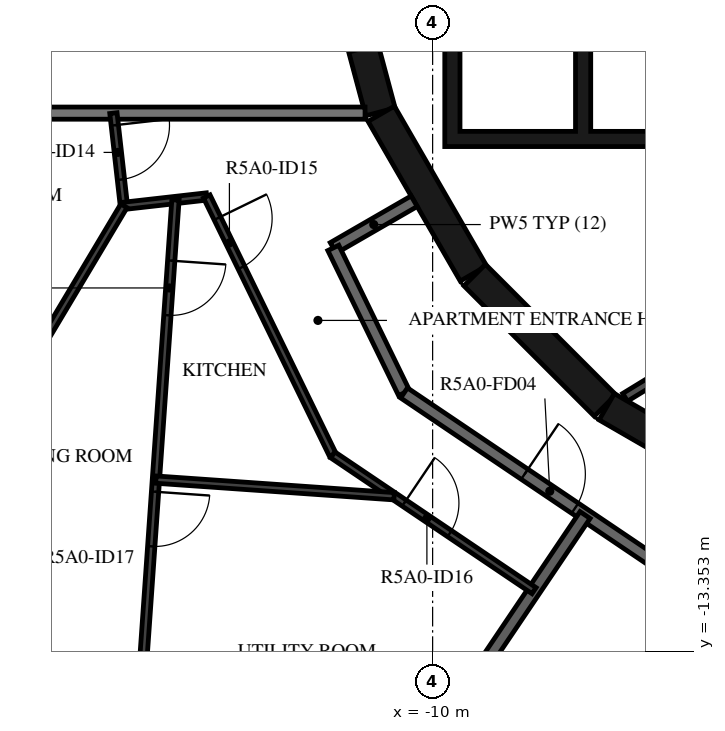
"""IFC4 building model, lengths in metres.
Left out: names, types, materials, properties, quantities, classifications, styles, units other than length and angle.
Written with IfcOpenShell. Run it as: python <this file> out.ifc"""

import sys

from ifc_helpers import new_model, si_unit, direction, frame, frame_2d, origin, place, context, subcontext, project, spatial, polyline, rectangle, outline, extrude, element, fill, save


model = new_model("IFC4")
c1 = context("Model", 3, precision=1e-05, world=origin(), true_north=direction((0.0, 1.0)))
c2 = subcontext(c1, "Body", "Model", "MODEL_VIEW")
j1 = project(units=[si_unit("LENGTHUNIT", "METRE"), si_unit("PLANEANGLEUNIT", "RADIAN")], contexts=[c1])
p1 = place(None, origin())
s1 = spatial("IfcSite", under=j1, at=p1, CompositionType="ELEMENT")
p2 = place(p1, origin())
s2 = spatial("IfcBuilding", under=s1, at=p2, CompositionType="ELEMENT")
p3 = place(p2, frame((0.0, 0.0, 195.4)))
s3 = spatial("IfcBuildingStorey", under=s2, at=p3, CompositionType="ELEMENT", Elevation=195.4)
p4 = place(p3, frame((-11.643, -1.55, 0.0), z_axis=(0.0, 0.0, 1.0), x_axis=(0.258734743916, -0.965948410781, 0.0)))
e1 = element("IfcWall", 1, at=p4, inside=s3, PredefinedType="SHEAR", context=c2, shape_type="SweptSolid", body=[
    extrude(rectangle(XDim=3.033, YDim=0.5, at=frame_2d((1.516, 0.0))), origin(), (0.0, 0.0, 1.0), 3.12),
])
p5 = place(p4, frame((1.066, 0.0, 0.0)))
e2 = element("IfcOpeningElement", 2, at=p5, cuts=e1, PredefinedType="OPENING", context=c2, shape_type="SweptSolid", body=[
    extrude(rectangle(XDim=0.9, YDim=2.1, at=frame_2d((0.45, 1.05))), frame((0.0, 0.26, 0.0), z_axis=(0.0, -1.0, 0.0), x_axis=(1.0, 0.0, 0.0)), (0.0, 0.0, 1.0), 0.52),
])
p6 = place(p3, frame((-10.845, -4.51, 0.0), z_axis=(0.0, 0.0, 1.0), x_axis=(0.500087131594, -0.865975092491, 0.0)))
e3 = element("IfcWall", 3, at=p6, inside=s3, PredefinedType="SHEAR", context=c2, shape_type="SweptSolid", body=[
    extrude(rectangle(XDim=3.033, YDim=0.5, at=frame_2d((1.516, 0.0))), origin(), (0.0, 0.0, 1.0), 3.12),
])
p7 = place(p3, frame((-9.308, -7.164, 0.0), z_axis=(0.0, 0.0, 1.0), x_axis=(0.707106781187, -0.707106781187, 0.0)))
e4 = element("IfcWall", 4, at=p7, inside=s3, PredefinedType="SHEAR", context=c2, shape_type="SweptSolid", body=[
    extrude(rectangle(XDim=3.032, YDim=0.5, at=frame_2d((1.516, 0.0))), origin(), (0.0, 0.0, 1.0), 3.12),
])
p8 = place(p3, frame((-7.137, -9.329, 0.0), z_axis=(0.0, 0.0, 1.0), x_axis=(0.865975092491, -0.500087131594, 0.0)))
e5 = element("IfcWall", 5, at=p8, inside=s3, PredefinedType="SHEAR", context=c2, shape_type="SweptSolid", body=[
    extrude(rectangle(XDim=3.033, YDim=0.5, at=frame_2d((1.516, 0.0))), origin(), (0.0, 0.0, 1.0), 3.12),
])
p9 = place(p3, origin())
e6 = element("IfcWall", 6, at=p9, inside=s3, PredefinedType="SHEAR", context=c2, shape_type="SweptSolid", body=[
    extrude(outline(polyline([(9.8, -5.05), (9.8, -4.8), (9.8, -1.9), (9.55, -1.9), (9.55, -4.8), (7.65, -4.8), (7.65, -1.9), (7.4, -1.9), (7.4, -4.8), (5.5, -4.8), (5.5, -1.9), (5.25, -1.9), (5.25, -4.8), (3.35, -4.8), (3.35, -1.9), (3.1, -1.9), (3.1, -4.8), (1.2, -4.8), (1.2, -1.9), (0.95, -1.9), (0.95, -4.8), (-0.95, -4.8), (-0.95, -1.9), (-1.2, -1.9), (-1.2, -4.8), (-3.1, -4.8), (-3.1, -1.9), (-3.35, -1.9), (-3.35, -4.8), (-5.25, -4.8), (-5.25, -1.9), (-5.5, -1.9), (-5.5, -4.8), (-7.4, -4.8), (-7.4, -1.9), (-7.65, -1.9), (-7.65, -4.8), (-9.55, -4.8), (-9.55, -1.9), (-9.8, -1.9), (-9.8, -4.8), (-9.8, -5.05), (9.8, -5.05)])), origin(), (0.0, 0.0, 1.0), 3.12),
])
p10 = place(p3, frame((-2.451, -6.495, 0.0), z_axis=(0.0, 0.0, 1.0), x_axis=(-0.853250115418, -0.521501908471, 0.0)))
e7 = element("IfcWall", 7, at=p10, inside=s3, PredefinedType="PARTITIONING", context=c2, shape_type="SweptSolid", body=[
    extrude(rectangle(XDim=5.137, YDim=0.15, at=frame_2d((2.569, 0.0))), origin(), (0.0, 0.0, 1.0), 3.12),
])
p11 = place(p10, frame((2.119, 0.0, 0.0)))
e8 = element("IfcOpeningElement", 8, at=p11, cuts=e7, PredefinedType="OPENING", context=c2, shape_type="SweptSolid", body=[
    extrude(rectangle(XDim=0.9, YDim=2.1, at=frame_2d((0.45, 1.05))), frame((0.0, 0.085, 0.0), z_axis=(0.0, -1.0, 0.0), x_axis=(1.0, 0.0, 0.0)), (0.0, 0.0, 1.0), 0.17),
])
p12 = place(p3, frame((-10.303, -5.949, 0.0), z_axis=(0.0, 0.0, 1.0), x_axis=(-0.866042588199, -0.499970234539, 0.0)))
e9 = element("IfcWall", 9, at=p12, inside=s3, PredefinedType="STANDARD", context=c2, shape_type="SweptSolid", body=[
    extrude(rectangle(XDim=1.535, YDim=0.2, at=frame_2d((0.768, 0.0))), origin(), (0.0, 0.0, 1.0), 3.12),
])
p13 = place(p3, frame((-11.633, -6.716, 0.0), z_axis=(0.0, 0.0, 1.0), x_axis=(0.438322116278, -0.898817958422, 0.0)))
e10 = element("IfcWall", 10, at=p13, inside=s3, PredefinedType="STANDARD", context=c2, shape_type="SweptSolid", body=[
    extrude(rectangle(XDim=2.654, YDim=0.2, at=frame_2d((1.327, 0.0))), origin(), (0.0, 0.0, 1.0), 3.12),
])
p14 = place(p3, frame((-10.47, -9.101, 0.0), z_axis=(0.0, 0.0, 1.0), x_axis=(0.829035841718, -0.559195469534, 0.0)))
e11 = element("IfcWall", 11, at=p14, inside=s3, PredefinedType="STANDARD", context=c2, shape_type="SweptSolid", body=[
    extrude(rectangle(XDim=7.181, YDim=0.2, at=frame_2d((3.591, 0.0))), origin(), (0.0, 0.0, 1.0), 3.12),
])
p15 = place(p14, frame((2.39, 0.0, 0.0)))
e12 = element("IfcOpeningElement", 12, at=p15, cuts=e11, PredefinedType="OPENING", context=c2, shape_type="SweptSolid", body=[
    extrude(rectangle(XDim=1.0, YDim=2.1, at=frame_2d((0.5, 1.05))), frame((0.0, 0.11, 0.0), z_axis=(0.0, -1.0, 0.0), x_axis=(1.0, 0.0, 0.0)), (0.0, 0.0, 1.0), 0.22),
])
p16 = place(p3, frame((-18.55, -4.5, 0.0), z_axis=(0.0, 0.0, 1.0), x_axis=(1.0, 0.0, 0.0)))
e13 = element("IfcWall", 13, at=p16, inside=s3, PredefinedType="STANDARD", context=c2, shape_type="SweptSolid", body=[
    extrude(rectangle(XDim=7.438, YDim=0.2, at=frame_2d((3.719, 0.0))), origin(), (0.0, 0.0, 1.0), 3.12),
])
p17 = place(p3, frame((-10.407, -15.43, 0.0), z_axis=(0.0, 0.0, 1.0), x_axis=(0.559038328133, 0.829141813973, 0.0)))
e14 = element("IfcWall", 14, at=p17, inside=s3, PredefinedType="STANDARD", context=c2, shape_type="SweptSolid", body=[
    extrude(rectangle(XDim=5.212, YDim=0.2, at=frame_2d((2.606, 0.0))), origin(), (0.0, 0.0, 1.0), 3.12),
])
p18 = place(p3, frame((-15.25, -4.5, 0.0), z_axis=(0.0, 0.0, 1.0), x_axis=(0.1124919794, -0.99365263275, 0.0)))
e15 = element("IfcWall", 15, at=p18, inside=s3, PredefinedType="PARTITIONING", context=c2, shape_type="SweptSolid", body=[
    extrude(rectangle(XDim=1.534, YDim=0.12, at=frame_2d((0.767, 0.0))), origin(), (0.0, 0.0, 1.0), 3.12),
])
p19 = place(p18, frame((0.2, 0.0, 0.0)))
e16 = element("IfcOpeningElement", 16, at=p19, cuts=e15, PredefinedType="OPENING", context=c2, shape_type="SweptSolid", body=[
    extrude(rectangle(XDim=0.9, YDim=2.1, at=frame_2d((0.45, 1.05))), frame((0.0, 0.07, 0.0), z_axis=(0.0, -1.0, 0.0), x_axis=(1.0, 0.0, 0.0)), (0.0, 0.0, 1.0), 0.14),
])
p20 = place(p3, frame((-15.077, -6.025, 0.0), z_axis=(0.0, 0.0, 1.0), x_axis=(0.993646958109, 0.112542092746, 0.0)))
e17 = element("IfcWall", 17, at=p20, inside=s3, PredefinedType="PARTITIONING", context=c2, shape_type="SweptSolid", body=[
    extrude(rectangle(XDim=1.371, YDim=0.12, at=frame_2d((0.686, 0.0))), origin(), (0.0, 0.0, 1.0), 3.12),
])
p21 = place(p3, frame((-13.715, -5.87, 0.0), z_axis=(0.0, 0.0, 1.0), x_axis=(0.438372766482, -0.89879325632, 0.0)))
e18 = element("IfcWall", 18, at=p21, inside=s3, PredefinedType="PARTITIONING", context=c2, shape_type="SweptSolid", body=[
    extrude(rectangle(XDim=4.728, YDim=0.12, at=frame_2d((2.364, 0.0))), origin(), (0.0, 0.0, 1.0), 3.12),
])
p22 = place(p21, frame((0.4, 0.0, 0.0)))
e19 = element("IfcOpeningElement", 19, at=p22, cuts=e18, PredefinedType="OPENING", context=c2, shape_type="SweptSolid", body=[
    extrude(rectangle(XDim=0.9, YDim=2.1, at=frame_2d((0.45, 1.05))), frame((0.0, 0.07, 0.0), z_axis=(0.0, -1.0, 0.0), x_axis=(1.0, 0.0, 0.0)), (0.0, 0.0, 1.0), 0.14),
])
p23 = place(p3, frame((-11.642, -10.12, 0.0), z_axis=(0.0, 0.0, 1.0), x_axis=(0.829018066952, -0.559221820629, 0.0)))
e20 = element("IfcWall", 20, at=p23, inside=s3, PredefinedType="PARTITIONING", context=c2, shape_type="SweptSolid", body=[
    extrude(rectangle(XDim=3.992, YDim=0.12, at=frame_2d((1.996, 0.0))), origin(), (0.0, 0.0, 1.0), 3.12),
])
p24 = place(p23, frame((1.417, 0.0, 0.0)))
e21 = element("IfcOpeningElement", 21, at=p24, cuts=e20, PredefinedType="OPENING", context=c2, shape_type="SweptSolid", body=[
    extrude(rectangle(XDim=0.9, YDim=2.1, at=frame_2d((0.45, 1.05))), frame((0.0, 0.07, 0.0), z_axis=(0.0, -1.0, 0.0), x_axis=(1.0, 0.0, 0.0)), (0.0, 0.0, 1.0), 0.14),
])
p25 = place(p3, frame((-19.156, -12.863, 0.0), z_axis=(0.0, 0.0, 1.0), x_axis=(0.512316386407, 0.858796786335, 0.0)))
e22 = element("IfcWall", 22, at=p25, inside=s3, PredefinedType="PARTITIONING", context=c2, shape_type="SweptSolid", body=[
    extrude(rectangle(XDim=7.963, YDim=0.12, at=frame_2d((3.981, 0.0))), origin(), (0.0, 0.0, 1.0), 3.12),
])
p26 = place(p3, frame((-14.229, -5.929, 0.0), z_axis=(0.0, 0.0, 1.0), x_axis=(-0.069740723375, -0.997565151508, 0.0)))
e23 = element("IfcWall", 23, at=p26, inside=s3, PredefinedType="PARTITIONING", context=c2, shape_type="SweptSolid", body=[
    extrude(rectangle(XDim=10.47, YDim=0.12, at=frame_2d((5.235, 0.0))), origin(), (0.0, 0.0, 1.0), 3.12),
])
p27 = place(p26, frame((4.809, 0.0, 0.0)))
e24 = element("IfcOpeningElement", 24, at=p27, cuts=e23, PredefinedType="OPENING", context=c2, shape_type="SweptSolid", body=[
    extrude(rectangle(XDim=0.9, YDim=2.1, at=frame_2d((0.45, 1.05))), frame((0.0, 0.07, 0.0), z_axis=(0.0, -1.0, 0.0), x_axis=(1.0, 0.0, 0.0)), (0.0, 0.0, 1.0), 0.14),
])
p28 = place(p26, frame((1.0, 0.0, 0.0)))
e25 = element("IfcOpeningElement", 25, at=p28, cuts=e23, PredefinedType="OPENING", context=c2, shape_type="SweptSolid", body=[
    extrude(rectangle(XDim=0.9, YDim=2.1, at=frame_2d((0.45, 1.05))), frame((0.0, 0.07, 0.0), z_axis=(0.0, -1.0, 0.0), x_axis=(1.0, 0.0, 0.0)), (0.0, 0.0, 1.0), 0.14),
])
p29 = place(p3, frame((-14.551, -10.527, 0.0), z_axis=(0.0, 0.0, 1.0), x_axis=(0.997564247633, -0.069753651118, 0.0)))
e26 = element("IfcWall", 26, at=p29, inside=s3, PredefinedType="PARTITIONING", context=c2, shape_type="SweptSolid", body=[
    extrude(rectangle(XDim=3.927, YDim=0.12, at=frame_2d((1.963, 0.0))), origin(), (0.0, 0.0, 1.0), 3.12),
])
p30 = place(p15, origin())
e27 = element("IfcDoor", 27, at=p30, inside=s3, OperationType="SINGLE_SWING_RIGHT", PredefinedType="DOOR", context=c2, shape_type="SweptSolid", body=[
    extrude(rectangle(XDim=1.0, YDim=2.1, at=frame_2d((0.5, 1.05))), frame((0.0, 0.025, 0.0), z_axis=(0.0, -1.0, 0.0), x_axis=(1.0, 0.0, 0.0)), (0.0, 0.0, 1.0), 0.05),
])
fill(e12, e27)
p31 = place(p19, origin())
e28 = element("IfcDoor", 28, at=p31, inside=s3, OperationType="SINGLE_SWING_RIGHT", PredefinedType="DOOR", context=c2, shape_type="SweptSolid", body=[
    extrude(rectangle(XDim=0.9, YDim=2.1, at=frame_2d((0.45, 1.05))), frame((0.0, 0.025, 0.0), z_axis=(0.0, -1.0, 0.0), x_axis=(1.0, 0.0, 0.0)), (0.0, 0.0, 1.0), 0.05),
])
fill(e16, e28)
p32 = place(p22, origin())
e29 = element("IfcDoor", 29, at=p32, inside=s3, OperationType="SINGLE_SWING_RIGHT", PredefinedType="DOOR", context=c2, shape_type="SweptSolid", body=[
    extrude(rectangle(XDim=0.9, YDim=2.1, at=frame_2d((0.45, 1.05))), frame((0.0, 0.025, 0.0), z_axis=(0.0, -1.0, 0.0), x_axis=(1.0, 0.0, 0.0)), (0.0, 0.0, 1.0), 0.05),
])
fill(e19, e29)
p33 = place(p24, origin())
e30 = element("IfcDoor", 30, at=p33, inside=s3, OperationType="SINGLE_SWING_RIGHT", PredefinedType="DOOR", context=c2, shape_type="SweptSolid", body=[
    extrude(rectangle(XDim=0.9, YDim=2.1, at=frame_2d((0.45, 1.05))), frame((0.0, 0.025, 0.0), z_axis=(0.0, -1.0, 0.0), x_axis=(1.0, 0.0, 0.0)), (0.0, 0.0, 1.0), 0.05),
])
fill(e21, e30)
p34 = place(p27, origin())
e31 = element("IfcDoor", 31, at=p34, inside=s3, OperationType="SINGLE_SWING_RIGHT", PredefinedType="DOOR", context=c2, shape_type="SweptSolid", body=[
    extrude(rectangle(XDim=0.9, YDim=2.1, at=frame_2d((0.45, 1.05))), frame((0.0, 0.025, 0.0), z_axis=(0.0, -1.0, 0.0), x_axis=(1.0, 0.0, 0.0)), (0.0, 0.0, 1.0), 0.05),
])
fill(e24, e31)
p35 = place(p28, origin())
e32 = element("IfcDoor", 32, at=p35, inside=s3, OperationType="SINGLE_SWING_LEFT", PredefinedType="DOOR", context=c2, shape_type="SweptSolid", body=[
    extrude(rectangle(XDim=0.9, YDim=2.1, at=frame_2d((0.45, 1.05))), frame((0.0, 0.025, 0.0), z_axis=(0.0, -1.0, 0.0), x_axis=(1.0, 0.0, 0.0)), (0.0, 0.0, 1.0), 0.05),
])
fill(e25, e32)
save(model, sys.argv[1])
